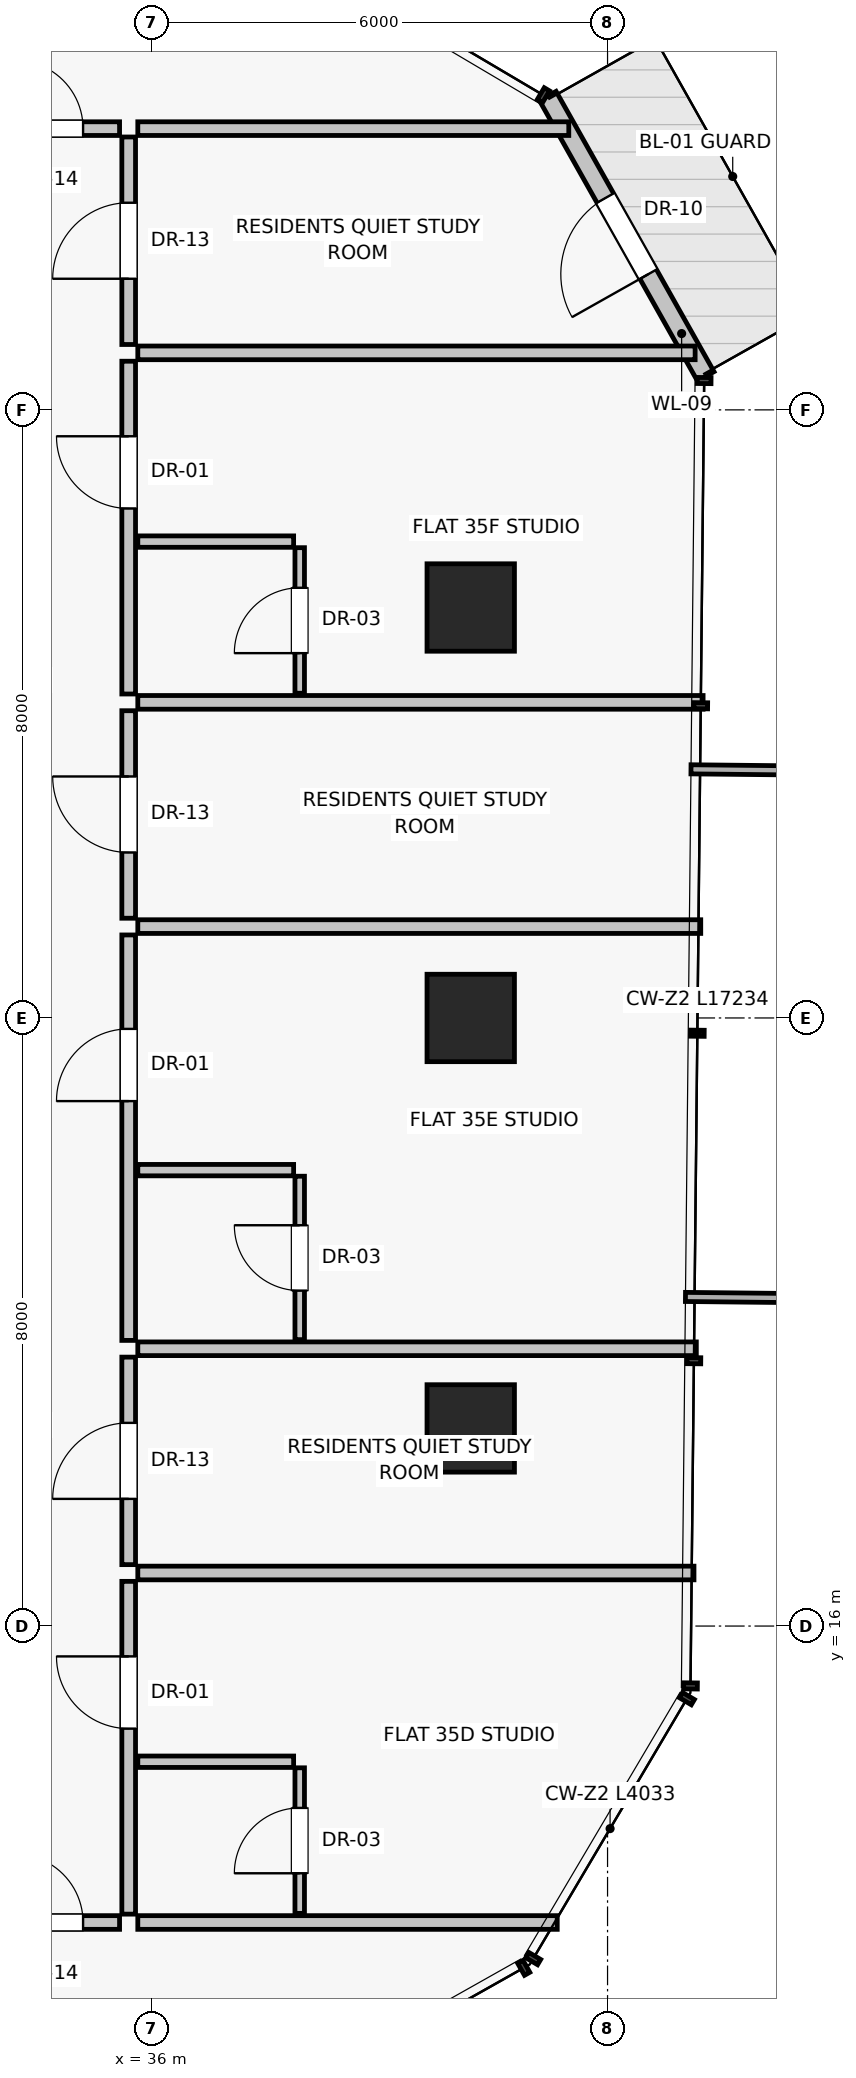
"""IFC4 building model, lengths in metres.
Left out: names, types, materials, properties, quantities, classifications, styles, units other than length and angle.
Written with IfcOpenShell. Run it as: python <this file> out.ifc"""

import sys

from ifc_helpers import new_model, si_unit, direction, frame, frame_2d, origin, origin_2d, place, context, subcontext, project, spatial, rectangle, extrude, source, transform, mapped, element, fill, save


model = new_model("IFC4")
c1 = context("Model", 3, precision=1e-05, world=origin(), true_north=direction((0.0, 1.0)))
c2 = subcontext(c1, "Body", "Model", "MODEL_VIEW")
j1 = project(units=[si_unit("LENGTHUNIT", "METRE"), si_unit("PLANEANGLEUNIT", "RADIAN")], contexts=[c1])
p1 = place(None, origin())
s1 = spatial("IfcSite", under=j1, at=p1, CompositionType="ELEMENT")
p2 = place(p1, origin())
s2 = spatial("IfcBuilding", under=s1, at=p2, CompositionType="ELEMENT")
p3 = place(p2, frame((0.0, 0.0, 126.25)))
s3 = spatial("IfcBuildingStorey", under=s2, at=p3, CompositionType="ELEMENT", Elevation=126.25)
for number, where, z_axis, x_axis in (
    (1, (40.2, 18.6, 0.0), (0.0, 0.0, 1.0), (1.0, 0.0, 0.0)),
    (2, (40.2, 24.0, 0.0), (0.0, 0.0, 1.0), (1.0, 0.0, 0.0)),
    (3, (40.2, 29.4, 0.0), (0.0, 0.0, 1.0), (1.0, 0.0, 0.0)),
):
    element("IfcColumn", number, at=place(p3, frame(where, z_axis=z_axis, x_axis=x_axis)), inside=s3, PredefinedType="COLUMN", context=c2, shape_type="SweptSolid", body=[
        extrude(rectangle(XDim=1.15, YDim=1.15, at=origin_2d()), origin(), (0.0, 0.0, 1.0), 3.25),
    ])
p4 = place(p3, frame((43.292, 32.441, 0.0), z_axis=(0.0, 0.0, 1.0), x_axis=(-0.490912790658, 0.871208718947, 0.0)))
e4 = element("IfcWall", 4, at=p4, inside=s3, PredefinedType="SOLIDWALL", context=c2, shape_type="SweptSolid", body=[
    extrude(rectangle(XDim=4.233, YDim=0.25, at=frame_2d((2.117, 0.0))), origin(), (0.0, 0.0, 1.0), 3.0),
])
p5 = place(p4, frame((1.542, 0.0, 0.0)))
e5 = element("IfcOpeningElement", 5, at=p5, cuts=e4, PredefinedType="OPENING", context=c2, shape_type="SweptSolid", body=[
    extrude(rectangle(XDim=1.15, YDim=2.25, at=frame_2d((0.575, 1.125))), frame((0.0, 0.135, 0.0), z_axis=(0.0, -1.0, 0.0), x_axis=(1.0, 0.0, 0.0)), (0.0, 0.0, 1.0), 0.27),
])
p6 = place(p3, frame((35.82, 12.1, 0.0), z_axis=(0.0, 0.0, 1.0), x_axis=(1.0, 0.0, 0.0)))
e6 = element("IfcWall", 6, at=p6, inside=s3, PredefinedType="PARTITIONING", context=c2, shape_type="SweptSolid", body=[
    extrude(rectangle(XDim=5.518, YDim=0.18, at=frame_2d((2.759, 0.0))), origin(), (0.0, 0.0, 1.0), 3.0),
])
p7 = place(p3, frame((35.82, 35.7, 0.0), z_axis=(0.0, 0.0, 1.0), x_axis=(1.0, 0.0, 0.0)))
e7 = element("IfcWall", 7, at=p7, inside=s3, PredefinedType="PARTITIONING", context=c2, shape_type="SweptSolid", body=[
    extrude(rectangle(XDim=5.67, YDim=0.18, at=frame_2d((2.835, 0.0))), origin(), (0.0, 0.0, 1.0), 3.0),
])
p8 = place(p3, frame((35.7, 16.808, 0.0), z_axis=(0.0, 0.0, 1.0), x_axis=(0.0, 1.0, 0.0)))
e8 = element("IfcWall", 8, at=p8, inside=s3, PredefinedType="PARTITIONING", context=c2, shape_type="SweptSolid", body=[
    extrude(rectangle(XDim=2.73, YDim=0.18, at=frame_2d((1.365, 0.0))), origin(), (0.0, 0.0, 1.0), 2.58),
])
p9 = place(p8, frame((0.865, 0.0, 0.0)))
e9 = element("IfcOpeningElement", 9, at=p9, cuts=e8, PredefinedType="OPENING", context=c2, shape_type="SweptSolid", body=[
    extrude(rectangle(XDim=1.0, YDim=2.01, at=frame_2d((0.5, 1.005))), frame((0.0, 0.1, 0.0), z_axis=(0.0, -1.0, 0.0), x_axis=(1.0, 0.0, 0.0)), (0.0, 0.0, 1.0), 0.2),
])
p10 = place(p3, frame((35.82, 16.698, 0.0), z_axis=(0.0, 0.0, 1.0), x_axis=(1.0, 0.0, 0.0)))
e10 = element("IfcWall", 10, at=p10, inside=s3, PredefinedType="PARTITIONING", context=c2, shape_type="SweptSolid", body=[
    extrude(rectangle(XDim=7.317, YDim=0.18, at=frame_2d((3.658, 0.0))), origin(), (0.0, 0.0, 1.0), 3.0),
])
p11 = place(p3, frame((35.7, 12.21, 0.0), z_axis=(0.0, 0.0, 1.0), x_axis=(0.0, 1.0, 0.0)))
e11 = element("IfcWall", 11, at=p11, inside=s3, PredefinedType="PARTITIONING", context=c2, shape_type="SweptSolid", body=[
    extrude(rectangle(XDim=4.378, YDim=0.18, at=frame_2d((2.189, 0.0))), origin(), (0.0, 0.0, 1.0), 3.0),
])
p12 = place(p11, frame((2.441, 0.0, 0.0)))
e12 = element("IfcOpeningElement", 12, at=p12, cuts=e11, PredefinedType="OPENING", context=c2, shape_type="SweptSolid", body=[
    extrude(rectangle(XDim=0.95, YDim=2.02, at=frame_2d((0.475, 1.01))), frame((0.0, 0.1, 0.0), z_axis=(0.0, -1.0, 0.0), x_axis=(1.0, 0.0, 0.0)), (0.0, 0.0, 1.0), 0.2),
])
p13 = place(p3, frame((35.82, 14.215, 0.0), z_axis=(0.0, 0.0, 1.0), x_axis=(1.0, 0.0, 0.0)))
e13 = element("IfcWall", 13, at=p13, inside=s3, PredefinedType="PARTITIONING", context=c2, shape_type="SweptSolid", body=[
    extrude(rectangle(XDim=2.05, YDim=0.15, at=frame_2d((1.025, 0.0))), origin(), (0.0, 0.0, 1.0), 3.0),
])
p14 = place(p3, frame((37.95, 12.22, 0.0), z_axis=(0.0, 0.0, 1.0), x_axis=(0.0, 1.0, 0.0)))
e14 = element("IfcWall", 14, at=p14, inside=s3, PredefinedType="PARTITIONING", context=c2, shape_type="SweptSolid", body=[
    extrude(rectangle(XDim=1.915, YDim=0.125, at=frame_2d((0.958, 0.0))), origin(), (0.0, 0.0, 1.0), 3.0),
])
p15 = place(p14, frame((0.528, 0.0, 0.0)))
e15 = element("IfcOpeningElement", 15, at=p15, cuts=e14, PredefinedType="OPENING", context=c2, shape_type="SweptSolid", body=[
    extrude(rectangle(XDim=0.86, YDim=2.01, at=frame_2d((0.43, 1.005))), frame((0.0, 0.073, 0.0), z_axis=(0.0, -1.0, 0.0), x_axis=(1.0, 0.0, 0.0)), (0.0, 0.0, 1.0), 0.145),
])
p16 = place(p3, frame((35.82, 19.648, 0.0), z_axis=(0.0, 0.0, 1.0), x_axis=(1.0, 0.0, 0.0)))
e16 = element("IfcWall", 16, at=p16, inside=s3, PredefinedType="PARTITIONING", context=c2, shape_type="SweptSolid", body=[
    extrude(rectangle(XDim=7.348, YDim=0.18, at=frame_2d((3.674, 0.0))), origin(), (0.0, 0.0, 1.0), 3.0),
])
p17 = place(p3, frame((35.7, 25.312, 0.0), z_axis=(0.0, 0.0, 1.0), x_axis=(0.0, 1.0, 0.0)))
e17 = element("IfcWall", 17, at=p17, inside=s3, PredefinedType="PARTITIONING", context=c2, shape_type="SweptSolid", body=[
    extrude(rectangle(XDim=2.73, YDim=0.18, at=frame_2d((1.365, 0.0))), origin(), (0.0, 0.0, 1.0), 2.58),
])
p18 = place(p17, frame((0.865, 0.0, 0.0)))
e18 = element("IfcOpeningElement", 18, at=p18, cuts=e17, PredefinedType="OPENING", context=c2, shape_type="SweptSolid", body=[
    extrude(rectangle(XDim=1.0, YDim=2.01, at=frame_2d((0.5, 1.005))), frame((0.0, 0.1, 0.0), z_axis=(0.0, -1.0, 0.0), x_axis=(1.0, 0.0, 0.0)), (0.0, 0.0, 1.0), 0.2),
])
p19 = place(p3, frame((35.82, 25.202, 0.0), z_axis=(0.0, 0.0, 1.0), x_axis=(1.0, 0.0, 0.0)))
e19 = element("IfcWall", 19, at=p19, inside=s3, PredefinedType="PARTITIONING", context=c2, shape_type="SweptSolid", body=[
    extrude(rectangle(XDim=7.406, YDim=0.18, at=frame_2d((3.703, 0.0))), origin(), (0.0, 0.0, 1.0), 3.0),
])
p20 = place(p3, frame((35.7, 19.758, 0.0), z_axis=(0.0, 0.0, 1.0), x_axis=(0.0, 1.0, 0.0)))
e20 = element("IfcWall", 20, at=p20, inside=s3, PredefinedType="PARTITIONING", context=c2, shape_type="SweptSolid", body=[
    extrude(rectangle(XDim=5.334, YDim=0.18, at=frame_2d((2.667, 0.0))), origin(), (0.0, 0.0, 1.0), 2.58),
])
p21 = place(p20, frame((3.148, 0.0, 0.0)))
e21 = element("IfcOpeningElement", 21, at=p21, cuts=e20, PredefinedType="OPENING", context=c2, shape_type="SweptSolid", body=[
    extrude(rectangle(XDim=0.95, YDim=2.02, at=frame_2d((0.475, 1.01))), frame((0.0, 0.1, 0.0), z_axis=(0.0, -1.0, 0.0), x_axis=(1.0, 0.0, 0.0)), (0.0, 0.0, 1.0), 0.2),
])
p22 = place(p3, frame((35.82, 21.998, 0.0), z_axis=(0.0, 0.0, 1.0), x_axis=(1.0, 0.0, 0.0)))
e22 = element("IfcWall", 22, at=p22, inside=s3, PredefinedType="PARTITIONING", context=c2, shape_type="SweptSolid", body=[
    extrude(rectangle(XDim=2.05, YDim=0.15, at=frame_2d((1.025, 0.0))), origin(), (0.0, 0.0, 1.0), 3.0),
])
p23 = place(p3, frame((37.95, 19.768, 0.0), z_axis=(0.0, 0.0, 1.0), x_axis=(0.0, 1.0, 0.0)))
e23 = element("IfcWall", 23, at=p23, inside=s3, PredefinedType="PARTITIONING", context=c2, shape_type="SweptSolid", body=[
    extrude(rectangle(XDim=2.15, YDim=0.125, at=frame_2d((1.075, 0.0))), origin(), (0.0, 0.0, 1.0), 3.0),
])
p24 = place(p23, frame((0.645, 0.0, 0.0)))
e24 = element("IfcOpeningElement", 24, at=p24, cuts=e23, PredefinedType="OPENING", context=c2, shape_type="SweptSolid", body=[
    extrude(rectangle(XDim=0.86, YDim=2.01, at=frame_2d((0.43, 1.005))), frame((0.0, 0.073, 0.0), z_axis=(0.0, -1.0, 0.0), x_axis=(1.0, 0.0, 0.0)), (0.0, 0.0, 1.0), 0.145),
])
p25 = place(p3, frame((35.82, 28.152, 0.0), z_axis=(0.0, 0.0, 1.0), x_axis=(1.0, 0.0, 0.0)))
e25 = element("IfcWall", 25, at=p25, inside=s3, PredefinedType="PARTITIONING", context=c2, shape_type="SweptSolid", body=[
    extrude(rectangle(XDim=7.437, YDim=0.18, at=frame_2d((3.719, 0.0))), origin(), (0.0, 0.0, 1.0), 3.0),
])
p26 = place(p3, frame((35.7, 32.86, 0.0), z_axis=(0.0, 0.0, 1.0), x_axis=(0.0, 1.0, 0.0)))
e26 = element("IfcWall", 26, at=p26, inside=s3, PredefinedType="PARTITIONING", context=c2, shape_type="SweptSolid", body=[
    extrude(rectangle(XDim=2.73, YDim=0.18, at=frame_2d((1.365, 0.0))), origin(), (0.0, 0.0, 1.0), 3.0),
])
p27 = place(p26, frame((0.865, 0.0, 0.0)))
e27 = element("IfcOpeningElement", 27, at=p27, cuts=e26, PredefinedType="OPENING", context=c2, shape_type="SweptSolid", body=[
    extrude(rectangle(XDim=1.0, YDim=2.01, at=frame_2d((0.5, 1.005))), frame((0.0, 0.1, 0.0), z_axis=(0.0, -1.0, 0.0), x_axis=(1.0, 0.0, 0.0)), (0.0, 0.0, 1.0), 0.2),
])
p28 = place(p3, frame((35.82, 32.75, 0.0), z_axis=(0.0, 0.0, 1.0), x_axis=(1.0, 0.0, 0.0)))
e28 = element("IfcWall", 28, at=p28, inside=s3, PredefinedType="PARTITIONING", context=c2, shape_type="SweptSolid", body=[
    extrude(rectangle(XDim=7.332, YDim=0.18, at=frame_2d((3.666, 0.0))), origin(), (0.0, 0.0, 1.0), 3.0),
])
p29 = place(p3, frame((35.7, 28.262, 0.0), z_axis=(0.0, 0.0, 1.0), x_axis=(0.0, 1.0, 0.0)))
e29 = element("IfcWall", 29, at=p29, inside=s3, PredefinedType="PARTITIONING", context=c2, shape_type="SweptSolid", body=[
    extrude(rectangle(XDim=4.378, YDim=0.18, at=frame_2d((2.189, 0.0))), origin(), (0.0, 0.0, 1.0), 2.58),
])
p30 = place(p29, frame((2.441, 0.0, 0.0)))
e30 = element("IfcOpeningElement", 30, at=p30, cuts=e29, PredefinedType="OPENING", context=c2, shape_type="SweptSolid", body=[
    extrude(rectangle(XDim=0.95, YDim=2.02, at=frame_2d((0.475, 1.01))), frame((0.0, 0.1, 0.0), z_axis=(0.0, -1.0, 0.0), x_axis=(1.0, 0.0, 0.0)), (0.0, 0.0, 1.0), 0.2),
])
p31 = place(p3, frame((35.82, 30.267, 0.0), z_axis=(0.0, 0.0, 1.0), x_axis=(1.0, 0.0, 0.0)))
e31 = element("IfcWall", 31, at=p31, inside=s3, PredefinedType="PARTITIONING", context=c2, shape_type="SweptSolid", body=[
    extrude(rectangle(XDim=2.05, YDim=0.15, at=frame_2d((1.025, 0.0))), origin(), (0.0, 0.0, 1.0), 2.378),
])
p32 = place(p3, frame((37.95, 28.272, 0.0), z_axis=(0.0, 0.0, 1.0), x_axis=(0.0, 1.0, 0.0)))
e32 = element("IfcWall", 32, at=p32, inside=s3, PredefinedType="PARTITIONING", context=c2, shape_type="SweptSolid", body=[
    extrude(rectangle(XDim=1.915, YDim=0.125, at=frame_2d((0.958, 0.0))), origin(), (0.0, 0.0, 1.0), 3.0),
])
p33 = place(p32, frame((0.528, 0.0, 0.0)))
e33 = element("IfcOpeningElement", 33, at=p33, cuts=e32, PredefinedType="OPENING", context=c2, shape_type="SweptSolid", body=[
    extrude(rectangle(XDim=0.86, YDim=2.01, at=frame_2d((0.43, 1.005))), frame((0.0, 0.073, 0.0), z_axis=(0.0, -1.0, 0.0), x_axis=(1.0, 0.0, 0.0)), (0.0, 0.0, 1.0), 0.145),
])
p34 = place(p3, frame((33.72, 12.1, 0.0), z_axis=(0.0, 0.0, 1.0), x_axis=(1.0, 0.0, 0.0)))
e34 = element("IfcWall", 34, at=p34, inside=s3, PredefinedType="PARTITIONING", context=c2, shape_type="SweptSolid", body=[
    extrude(rectangle(XDim=1.86, YDim=0.18, at=frame_2d((0.93, 0.0))), origin(), (0.0, 0.0, 1.0), 3.0),
])
p35 = place(p34, frame((0.48, 0.0, 0.0)))
e35 = element("IfcOpeningElement", 35, at=p35, cuts=e34, PredefinedType="OPENING", context=c2, shape_type="SweptSolid", body=[
    extrude(rectangle(XDim=0.9, YDim=2.01, at=frame_2d((0.45, 1.005))), frame((0.0, 0.1, 0.0), z_axis=(0.0, -1.0, 0.0), x_axis=(1.0, 0.0, 0.0)), (0.0, 0.0, 1.0), 0.2),
])
p36 = place(p3, frame((33.72, 35.7, 0.0), z_axis=(0.0, 0.0, 1.0), x_axis=(1.0, 0.0, 0.0)))
e36 = element("IfcWall", 36, at=p36, inside=s3, PredefinedType="PARTITIONING", context=c2, shape_type="SweptSolid", body=[
    extrude(rectangle(XDim=1.86, YDim=0.18, at=frame_2d((0.93, 0.0))), origin(), (0.0, 0.0, 1.0), 3.0),
])
p37 = place(p36, frame((0.48, 0.0, 0.0)))
e37 = element("IfcOpeningElement", 37, at=p37, cuts=e36, PredefinedType="OPENING", context=c2, shape_type="SweptSolid", body=[
    extrude(rectangle(XDim=0.9, YDim=2.01, at=frame_2d((0.45, 1.005))), frame((0.0, 0.1, 0.0), z_axis=(0.0, -1.0, 0.0), x_axis=(1.0, 0.0, 0.0)), (0.0, 0.0, 1.0), 0.2),
])
m1 = source(origin(), c2, "Body", "SweptSolid", [
    extrude(rectangle(XDim=1.15, YDim=2.25, at=frame_2d((0.575, 1.125))), frame((0.0, 0.025, 0.0), z_axis=(0.0, -1.0, 0.0), x_axis=(1.0, 0.0, 0.0)), (0.0, 0.0, 1.0), 0.05),
])
p38 = place(p5, frame((1.15, 0.0, 0.0), z_axis=(0.0, 0.0, 1.0), x_axis=(-1.0, 0.0, 0.0)))
e38 = element("IfcDoor", 38, at=p38, inside=s3, OperationType="SINGLE_SWING_LEFT", PredefinedType="DOOR", context=c2, shape_type="MappedRepresentation", body=[
    mapped(m1, transform((0.0, 0.0, 0.0), scale=1.0)),
])
fill(e5, e38)
m2 = source(origin(), c2, "Body", "SweptSolid", [
    extrude(rectangle(XDim=1.0, YDim=2.01, at=frame_2d((0.5, 1.005))), frame((0.0, 0.025, 0.0), z_axis=(0.0, -1.0, 0.0), x_axis=(1.0, 0.0, 0.0)), (0.0, 0.0, 1.0), 0.05),
])
p39 = place(p9, origin())
e39 = element("IfcDoor", 39, at=p39, inside=s3, OperationType="SINGLE_SWING_LEFT", PredefinedType="DOOR", context=c2, shape_type="MappedRepresentation", body=[
    mapped(m2, transform((0.0, 0.0, 0.0), scale=1.0)),
])
fill(e9, e39)
m3 = source(origin(), c2, "Body", "SweptSolid", [
    extrude(rectangle(XDim=0.95, YDim=2.02, at=frame_2d((0.475, 1.01))), frame((0.0, 0.025, 0.0), z_axis=(0.0, -1.0, 0.0), x_axis=(1.0, 0.0, 0.0)), (0.0, 0.0, 1.0), 0.05),
])
p40 = place(p12, origin())
e40 = element("IfcDoor", 40, at=p40, inside=s3, OperationType="SINGLE_SWING_RIGHT", PredefinedType="DOOR", context=c2, shape_type="MappedRepresentation", body=[
    mapped(m3, transform((0.0, 0.0, 0.0), scale=1.0)),
])
fill(e12, e40)
m4 = source(origin(), c2, "Body", "SweptSolid", [
    extrude(rectangle(XDim=0.86, YDim=2.01, at=frame_2d((0.43, 1.005))), frame((0.0, 0.025, 0.0), z_axis=(0.0, -1.0, 0.0), x_axis=(1.0, 0.0, 0.0)), (0.0, 0.0, 1.0), 0.05),
])
p41 = place(p15, origin())
e41 = element("IfcDoor", 41, at=p41, inside=s3, OperationType="SINGLE_SWING_LEFT", PredefinedType="DOOR", context=c2, shape_type="MappedRepresentation", body=[
    mapped(m4, transform((0.0, 0.0, 0.0), scale=1.0)),
])
fill(e15, e41)
p42 = place(p18, origin())
e42 = element("IfcDoor", 42, at=p42, inside=s3, OperationType="SINGLE_SWING_RIGHT", PredefinedType="DOOR", context=c2, shape_type="MappedRepresentation", body=[
    mapped(m2, transform((0.0, 0.0, 0.0), scale=1.0)),
])
fill(e18, e42)
p43 = place(p21, origin())
e43 = element("IfcDoor", 43, at=p43, inside=s3, OperationType="SINGLE_SWING_LEFT", PredefinedType="DOOR", context=c2, shape_type="MappedRepresentation", body=[
    mapped(m3, transform((0.0, 0.0, 0.0), scale=1.0)),
])
fill(e21, e43)
p44 = place(p24, origin())
e44 = element("IfcDoor", 44, at=p44, inside=s3, OperationType="SINGLE_SWING_RIGHT", PredefinedType="DOOR", context=c2, shape_type="MappedRepresentation", body=[
    mapped(m4, transform((0.0, 0.0, 0.0), scale=1.0)),
])
fill(e24, e44)
p45 = place(p27, origin())
e45 = element("IfcDoor", 45, at=p45, inside=s3, OperationType="SINGLE_SWING_LEFT", PredefinedType="DOOR", context=c2, shape_type="MappedRepresentation", body=[
    mapped(m2, transform((0.0, 0.0, 0.0), scale=1.0)),
])
fill(e27, e45)
p46 = place(p30, origin())
e46 = element("IfcDoor", 46, at=p46, inside=s3, OperationType="SINGLE_SWING_RIGHT", PredefinedType="DOOR", context=c2, shape_type="MappedRepresentation", body=[
    mapped(m3, transform((0.0, 0.0, 0.0), scale=1.0)),
])
fill(e30, e46)
p47 = place(p33, origin())
e47 = element("IfcDoor", 47, at=p47, inside=s3, OperationType="SINGLE_SWING_LEFT", PredefinedType="DOOR", context=c2, shape_type="MappedRepresentation", body=[
    mapped(m4, transform((0.0, 0.0, 0.0), scale=1.0)),
])
fill(e33, e47)
m5 = source(origin(), c2, "Body", "SweptSolid", [
    extrude(rectangle(XDim=0.9, YDim=2.01, at=frame_2d((0.45, 1.005))), frame((0.0, 0.025, 0.0), z_axis=(0.0, -1.0, 0.0), x_axis=(1.0, 0.0, 0.0)), (0.0, 0.0, 1.0), 0.05),
])
p48 = place(p35, origin())
e48 = element("IfcDoor", 48, at=p48, inside=s3, OperationType="SINGLE_SWING_LEFT", PredefinedType="DOOR", context=c2, shape_type="MappedRepresentation", body=[
    mapped(m5, transform((0.0, 0.0, 0.0), scale=1.0)),
])
fill(e35, e48)
p49 = place(p37, origin())
e49 = element("IfcDoor", 49, at=p49, inside=s3, OperationType="SINGLE_SWING_LEFT", PredefinedType="DOOR", context=c2, shape_type="MappedRepresentation", body=[
    mapped(m5, transform((0.0, 0.0, 0.0), scale=1.0)),
])
fill(e37, e49)
save(model, sys.argv[1])
